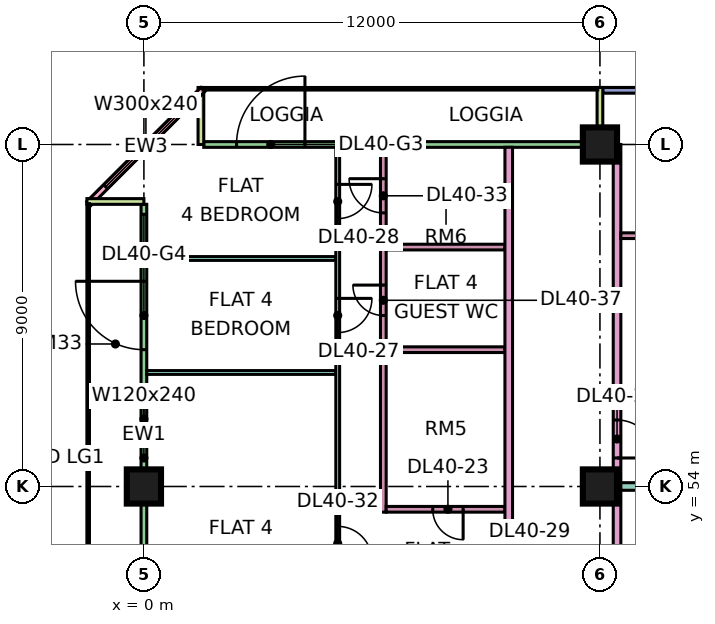
"""IFC4 building model, lengths in metres.
Left out: names, types, materials, properties, quantities, classifications, styles, units other than length and angle.
Written with IfcOpenShell. Run it as: python <this file> out.ifc"""

import sys

from ifc_helpers import new_model, si_unit, direction, frame, frame_2d, origin, origin_2d, place, context, subcontext, project, spatial, rectangle, extrude, element, fill, save


model = new_model("IFC4")
c1 = context("Model", 3, precision=1e-05, world=origin(), true_north=direction((0.0, 1.0)))
c2 = subcontext(c1, "Body", "Model", "MODEL_VIEW")
j1 = project(units=[si_unit("LENGTHUNIT", "METRE"), si_unit("PLANEANGLEUNIT", "RADIAN")], contexts=[c1])
p1 = place(None, origin())
s1 = spatial("IfcSite", under=j1, at=p1, CompositionType="ELEMENT")
p2 = place(p1, origin())
s2 = spatial("IfcBuilding", under=s1, at=p2, CompositionType="ELEMENT")
p3 = place(p2, frame((0.0, 0.0, 176.15)))
s3 = spatial("IfcBuildingStorey", under=s2, at=p3, CompositionType="ELEMENT", Elevation=176.15)
for number, where, z_axis, x_axis in (
    (1, (0.0, 54.0, 0.0), (0.0, 0.0, 1.0), (1.0, 0.0, 0.0)),
    (2, (12.0, 54.0, 0.0), (0.0, 0.0, 1.0), (1.0, 0.0, 0.0)),
    (3, (12.0, 63.0, 0.0), (0.0, 0.0, 1.0), (1.0, 0.0, 0.0)),
):
    element("IfcColumn", number, at=place(p3, frame(where, z_axis=z_axis, x_axis=x_axis)), inside=s3, PredefinedType="COLUMN", context=c2, shape_type="SweptSolid", body=[
        extrude(rectangle(XDim=0.9, YDim=0.9, at=origin_2d()), origin(), (0.0, 0.0, 1.0), 3.75),
    ])
p4 = place(p3, frame((22.5, 64.425, 0.0), z_axis=(0.0, 0.0, 1.0), x_axis=(-1.0, 0.0, 0.0)))
e4 = element("IfcWall", 4, at=p4, inside=s3, PredefinedType="SOLIDWALL", context=c2, shape_type="SweptSolid", body=[
    extrude(rectangle(XDim=10.425, YDim=0.15, at=frame_2d((5.212, 0.0))), origin(), (0.0, 0.0, 1.0), 3.35),
])
p5 = place(p4, frame((0.525, 0.0, 0.45)))
e5 = element("IfcOpeningElement", 5, at=p5, cuts=e4, PredefinedType="OPENING", context=c2, shape_type="SweptSolid", body=[
    extrude(rectangle(XDim=2.4, YDim=2.4, at=frame_2d((1.2, 1.2))), frame((0.0, 0.085, 0.0), z_axis=(0.0, -1.0, 0.0), x_axis=(1.0, 0.0, 0.0)), (0.0, 0.0, 1.0), 0.17),
])
p6 = place(p4, frame((5.85, 0.0, 0.45)))
e6 = element("IfcOpeningElement", 6, at=p6, cuts=e4, PredefinedType="OPENING", context=c2, shape_type="SweptSolid", body=[
    extrude(rectangle(XDim=3.0, YDim=2.4, at=frame_2d((1.5, 1.2))), frame((0.0, 0.085, 0.0), z_axis=(0.0, -1.0, 0.0), x_axis=(1.0, 0.0, 0.0)), (0.0, 0.0, 1.0), 0.17),
])
p7 = place(p3, frame((11.925, 63.0, 0.0), z_axis=(0.0, 0.0, 1.0), x_axis=(-1.0, 0.0, 0.0)))
e7 = element("IfcWall", 7, at=p7, inside=s3, PredefinedType="SOLIDWALL", context=c2, shape_type="SweptSolid", body=[
    extrude(rectangle(XDim=10.35, YDim=0.15, at=frame_2d((5.175, 0.0))), origin(), (0.0, 0.0, 1.0), 3.35),
])
p8 = place(p7, frame((7.688, 0.0, 0.0)))
e8 = element("IfcOpeningElement", 8, at=p8, cuts=e7, PredefinedType="OPENING", context=c2, shape_type="SweptSolid", body=[
    extrude(rectangle(XDim=1.8, YDim=2.4, at=frame_2d((0.9, 1.2))), frame((0.0, 0.085, 0.0), z_axis=(0.0, -1.0, 0.0), x_axis=(1.0, 0.0, 0.0)), (0.0, 0.0, 1.0), 0.17),
])
for number, where, z_axis, x_axis in (
    (9, (12.0, 64.5, 0.0), (0.0, 0.0, 1.0), (0.0, -1.0, 0.0)),
    (10, (1.5, 64.5, 0.0), (0.0, 0.0, 1.0), (0.0, -1.0, 0.0)),
):
    element("IfcWall", number, at=place(p3, frame(where, z_axis=z_axis, x_axis=x_axis)), inside=s3, PredefinedType="SOLIDWALL", context=c2, shape_type="SweptSolid", body=[
        extrude(rectangle(XDim=1.5, YDim=0.15, at=frame_2d((0.75, 0.0))), origin(), (0.0, 0.0, 1.0), 3.35),
    ])
p9 = place(p3, frame((1.553, 64.447, 0.0), z_axis=(0.0, 0.0, 1.0), x_axis=(-0.707106781187, -0.707106781187, 0.0)))
e11 = element("IfcWall", 11, at=p9, inside=s3, PredefinedType="SOLIDWALL", context=c2, shape_type="SweptSolid", body=[
    extrude(rectangle(XDim=4.243, YDim=0.15, at=frame_2d((2.121, 0.0))), origin(), (0.0, 0.0, 1.0), 3.35),
])
p10 = place(p9, frame((0.621, 0.0, 0.45)))
e12 = element("IfcOpeningElement", 12, at=p10, cuts=e11, PredefinedType="OPENING", context=c2, shape_type="SweptSolid", body=[
    extrude(rectangle(XDim=3.0, YDim=2.4, at=frame_2d((1.5, 1.2))), frame((0.0, 0.085, 0.0), z_axis=(0.0, -1.0, 0.0), x_axis=(1.0, 0.0, 0.0)), (0.0, 0.0, 1.0), 0.17),
])
p11 = place(p3, frame((0.0, 61.425, 0.0), z_axis=(0.0, 0.0, 1.0), x_axis=(0.0, -1.0, 0.0)))
e13 = element("IfcWall", 13, at=p11, inside=s3, PredefinedType="SOLIDWALL", context=c2, shape_type="SweptSolid", body=[
    extrude(rectangle(XDim=13.35, YDim=0.15, at=frame_2d((6.675, 0.0))), origin(), (0.0, 0.0, 1.0), 3.35),
])
p12 = place(p11, frame((0.262, 0.0, 0.45)))
e14 = element("IfcOpeningElement", 14, at=p12, cuts=e13, PredefinedType="OPENING", context=c2, shape_type="SweptSolid", body=[
    extrude(rectangle(XDim=0.9, YDim=2.4, at=frame_2d((0.45, 1.2))), frame((0.0, 0.085, 0.0), z_axis=(0.0, -1.0, 0.0), x_axis=(1.0, 0.0, 0.0)), (0.0, 0.0, 1.0), 0.17),
])
p13 = place(p11, frame((2.025, 0.0, 0.0)))
e15 = element("IfcOpeningElement", 15, at=p13, cuts=e13, PredefinedType="OPENING", context=c2, shape_type="SweptSolid", body=[
    extrude(rectangle(XDim=1.8, YDim=2.4, at=frame_2d((0.9, 1.2))), frame((0.0, 0.085, 0.0), z_axis=(0.0, -1.0, 0.0), x_axis=(1.0, 0.0, 0.0)), (0.0, 0.0, 1.0), 0.17),
])
p14 = place(p11, frame((5.05, 0.0, 0.45)))
e16 = element("IfcOpeningElement", 16, at=p14, cuts=e13, PredefinedType="OPENING", context=c2, shape_type="SweptSolid", body=[
    extrude(rectangle(XDim=1.2, YDim=2.4, at=frame_2d((0.6, 1.2))), frame((0.0, 0.085, 0.0), z_axis=(0.0, -1.0, 0.0), x_axis=(1.0, 0.0, 0.0)), (0.0, 0.0, 1.0), 0.17),
])
p15 = place(p11, frame((9.163, 0.0, 0.45)))
e17 = element("IfcOpeningElement", 17, at=p15, cuts=e13, PredefinedType="OPENING", context=c2, shape_type="SweptSolid", body=[
    extrude(rectangle(XDim=3.0, YDim=2.4, at=frame_2d((1.5, 1.2))), frame((0.0, 0.085, 0.0), z_axis=(0.0, -1.0, 0.0), x_axis=(1.0, 0.0, 0.0)), (0.0, 0.0, 1.0), 0.17),
])
p16 = place(p3, frame((-1.5, 61.5, 0.0), z_axis=(0.0, 0.0, 1.0), x_axis=(1.0, 0.0, 0.0)))
e18 = element("IfcWall", 18, at=p16, inside=s3, PredefinedType="SOLIDWALL", context=c2, shape_type="SweptSolid", body=[
    extrude(rectangle(XDim=1.5, YDim=0.15, at=frame_2d((0.75, 0.0))), origin(), (0.0, 0.0, 1.0), 3.35),
])
for number, where, z_axis, x_axis in (
    (19, (0.074, 57.0, 0.0), (0.0, 0.0, 1.0), (1.0, 0.0, 0.0)),
    (20, (0.074, 60.0, 0.0), (0.0, 0.0, 1.0), (1.0, 0.0, 0.0)),
):
    element("IfcWall", number, at=place(p3, frame(where, z_axis=z_axis, x_axis=x_axis)), inside=s3, PredefinedType="PARTITIONING", context=c2, shape_type="SweptSolid", body=[
        extrude(rectangle(XDim=4.976, YDim=0.1, at=frame_2d((2.488, 0.0))), origin(), (0.0, 0.0, 1.0), 3.35),
    ])
p17 = place(p3, frame((5.1, 36.1, 0.0), z_axis=(0.0, 0.0, 1.0), x_axis=(0.0, 1.0, 0.0)))
e21 = element("IfcWall", 21, at=p17, inside=s3, PredefinedType="PARTITIONING", context=c2, shape_type="SweptSolid", body=[
    extrude(rectangle(XDim=26.826, YDim=0.1, at=frame_2d((13.413, 0.0))), origin(), (0.0, 0.0, 1.0), 3.35),
])
p18 = place(p17, frame((0.95, 0.0, 0.0)))
e22 = element("IfcOpeningElement", 22, at=p18, cuts=e21, PredefinedType="OPENING", context=c2, shape_type="SweptSolid", body=[
    extrude(rectangle(XDim=0.9, YDim=2.1, at=frame_2d((0.45, 1.05))), frame((0.0, 0.06, 0.0), z_axis=(0.0, -1.0, 0.0), x_axis=(1.0, 0.0, 0.0)), (0.0, 0.0, 1.0), 0.12),
])
p19 = place(p17, frame((3.95, 0.0, 0.0)))
e23 = element("IfcOpeningElement", 23, at=p19, cuts=e21, PredefinedType="OPENING", context=c2, shape_type="SweptSolid", body=[
    extrude(rectangle(XDim=0.9, YDim=2.1, at=frame_2d((0.45, 1.05))), frame((0.0, 0.06, 0.0), z_axis=(0.0, -1.0, 0.0), x_axis=(1.0, 0.0, 0.0)), (0.0, 0.0, 1.0), 0.12),
])
p20 = place(p17, frame((9.95, 0.0, 0.0)))
e24 = element("IfcOpeningElement", 24, at=p20, cuts=e21, PredefinedType="OPENING", context=c2, shape_type="SweptSolid", body=[
    extrude(rectangle(XDim=0.9, YDim=2.1, at=frame_2d((0.45, 1.05))), frame((0.0, 0.06, 0.0), z_axis=(0.0, -1.0, 0.0), x_axis=(1.0, 0.0, 0.0)), (0.0, 0.0, 1.0), 0.12),
])
p21 = place(p17, frame((21.95, 0.0, 0.0)))
e25 = element("IfcOpeningElement", 25, at=p21, cuts=e21, PredefinedType="OPENING", context=c2, shape_type="SweptSolid", body=[
    extrude(rectangle(XDim=0.9, YDim=2.1, at=frame_2d((0.45, 1.05))), frame((0.0, 0.06, 0.0), z_axis=(0.0, -1.0, 0.0), x_axis=(1.0, 0.0, 0.0)), (0.0, 0.0, 1.0), 0.12),
])
p22 = place(p17, frame((24.95, 0.0, 0.0)))
e26 = element("IfcOpeningElement", 26, at=p22, cuts=e21, PredefinedType="OPENING", context=c2, shape_type="SweptSolid", body=[
    extrude(rectangle(XDim=0.9, YDim=2.1, at=frame_2d((0.45, 1.05))), frame((0.0, 0.06, 0.0), z_axis=(0.0, -1.0, 0.0), x_axis=(1.0, 0.0, 0.0)), (0.0, 0.0, 1.0), 0.12),
])
p23 = place(p17, frame((15.95, 0.0, 0.0)))
e27 = element("IfcOpeningElement", 27, at=p23, cuts=e21, PredefinedType="OPENING", context=c2, shape_type="SweptSolid", body=[
    extrude(rectangle(XDim=0.9, YDim=2.1, at=frame_2d((0.45, 1.05))), frame((0.0, 0.06, 0.0), z_axis=(0.0, -1.0, 0.0), x_axis=(1.0, 0.0, 0.0)), (0.0, 0.0, 1.0), 0.12),
])
p24 = place(p17, frame((6.95, 0.0, 0.0)))
e28 = element("IfcOpeningElement", 28, at=p24, cuts=e21, PredefinedType="OPENING", context=c2, shape_type="SweptSolid", body=[
    extrude(rectangle(XDim=0.9, YDim=2.1, at=frame_2d((0.45, 1.05))), frame((0.0, 0.06, 0.0), z_axis=(0.0, -1.0, 0.0), x_axis=(1.0, 0.0, 0.0)), (0.0, 0.0, 1.0), 0.12),
])
p25 = place(p3, frame((6.3, 53.325, 0.0), z_axis=(0.0, 0.0, 1.0), x_axis=(0.0, 1.0, 0.0)))
e29 = element("IfcWall", 29, at=p25, inside=s3, PredefinedType="PARTITIONING", context=c2, shape_type="SweptSolid", body=[
    extrude(rectangle(XDim=9.601, YDim=0.15, at=frame_2d((4.801, 0.0))), origin(), (0.0, 0.0, 1.0), 3.35),
])
p26 = place(p25, frame((7.875, 0.0, 0.0)))
e30 = element("IfcOpeningElement", 30, at=p26, cuts=e29, PredefinedType="OPENING", context=c2, shape_type="SweptSolid", body=[
    extrude(rectangle(XDim=0.9, YDim=2.1, at=frame_2d((0.45, 1.05))), frame((0.0, 0.085, 0.0), z_axis=(0.0, -1.0, 0.0), x_axis=(1.0, 0.0, 0.0)), (0.0, 0.0, 1.0), 0.17),
])
p27 = place(p25, frame((5.175, 0.0, 0.0)))
e31 = element("IfcOpeningElement", 31, at=p27, cuts=e29, PredefinedType="OPENING", context=c2, shape_type="SweptSolid", body=[
    extrude(rectangle(XDim=0.8, YDim=2.1, at=frame_2d((0.4, 1.05))), frame((0.0, 0.085, 0.0), z_axis=(0.0, -1.0, 0.0), x_axis=(1.0, 0.0, 0.0)), (0.0, 0.0, 1.0), 0.17),
])
p28 = place(p3, frame((6.375, 53.4, 0.0), z_axis=(0.0, 0.0, 1.0), x_axis=(1.0, 0.0, 0.0)))
e32 = element("IfcWall", 32, at=p28, inside=s3, PredefinedType="PARTITIONING", context=c2, shape_type="SweptSolid", body=[
    extrude(rectangle(XDim=3.125, YDim=0.15, at=frame_2d((1.562, 0.0))), origin(), (0.0, 0.0, 1.0), 3.35),
])
p29 = place(p28, frame((1.225, 0.0, 0.0)))
e33 = element("IfcOpeningElement", 33, at=p29, cuts=e32, PredefinedType="OPENING", context=c2, shape_type="SweptSolid", body=[
    extrude(rectangle(XDim=0.8, YDim=2.1, at=frame_2d((0.4, 1.05))), frame((0.0, 0.085, 0.0), z_axis=(0.0, -1.0, 0.0), x_axis=(1.0, 0.0, 0.0)), (0.0, 0.0, 1.0), 0.17),
])
for number, where, z_axis, x_axis in (
    (34, (6.375, 57.6, 0.0), (0.0, 0.0, 1.0), (1.0, 0.0, 0.0)),
    (35, (6.375, 60.3, 0.0), (0.0, 0.0, 1.0), (1.0, 0.0, 0.0)),
):
    element("IfcWall", number, at=place(p3, frame(where, z_axis=z_axis, x_axis=x_axis)), inside=s3, PredefinedType="PARTITIONING", context=c2, shape_type="SweptSolid", body=[
        extrude(rectangle(XDim=3.125, YDim=0.15, at=frame_2d((1.562, 0.0))), origin(), (0.0, 0.0, 1.0), 3.35),
    ])
p30 = place(p3, frame((9.6, 20.0, 0.0), z_axis=(0.0, 0.0, 1.0), x_axis=(0.0, 1.0, 0.0)))
e36 = element("IfcWall", 36, at=p30, inside=s3, PredefinedType="PARTITIONING", context=c2, shape_type="SweptSolid", body=[
    extrude(rectangle(XDim=42.926, YDim=0.2, at=frame_2d((21.463, 0.0))), origin(), (0.0, 0.0, 1.0), 3.35),
])
p31 = place(p30, frame((31.35, 0.0, 0.0)))
e37 = element("IfcOpeningElement", 37, at=p31, cuts=e36, PredefinedType="OPENING", context=c2, shape_type="SweptSolid", body=[
    extrude(rectangle(XDim=1.0, YDim=2.1, at=frame_2d((0.5, 1.05))), frame((0.0, 0.11, 0.0), z_axis=(0.0, -1.0, 0.0), x_axis=(1.0, 0.0, 0.0)), (0.0, 0.0, 1.0), 0.22),
])
p32 = place(p30, frame((0.6, 0.0, 0.0)))
e38 = element("IfcOpeningElement", 38, at=p32, cuts=e36, PredefinedType="OPENING", context=c2, shape_type="SweptSolid", body=[
    extrude(rectangle(XDim=1.2, YDim=2.1, at=frame_2d((0.6, 1.05))), frame((0.0, 0.11, 0.0), z_axis=(0.0, -1.0, 0.0), x_axis=(1.0, 0.0, 0.0)), (0.0, 0.0, 1.0), 0.22),
])
p33 = place(p30, frame((3.9, 0.0, 0.0)))
e39 = element("IfcOpeningElement", 39, at=p33, cuts=e36, PredefinedType="OPENING", context=c2, shape_type="SweptSolid", body=[
    extrude(rectangle(XDim=1.0, YDim=2.1, at=frame_2d((0.5, 1.05))), frame((0.0, 0.11, 0.0), z_axis=(0.0, -1.0, 0.0), x_axis=(1.0, 0.0, 0.0)), (0.0, 0.0, 1.0), 0.22),
])
p34 = place(p3, frame((12.45, 20.0, 0.0), z_axis=(0.0, 0.0, 1.0), x_axis=(0.0, 1.0, 0.0)))
e40 = element("IfcWall", 40, at=p34, inside=s3, PredefinedType="PARTITIONING", context=c2, shape_type="SweptSolid", body=[
    extrude(rectangle(XDim=43.0, YDim=0.2, at=frame_2d((21.5, 0.0))), origin(), (0.0, 0.0, 1.0), 3.35),
])
p35 = place(p34, frame((5.95, 0.0, 0.0)))
e41 = element("IfcOpeningElement", 41, at=p35, cuts=e40, PredefinedType="OPENING", context=c2, shape_type="SweptSolid", body=[
    extrude(rectangle(XDim=1.0, YDim=2.1, at=frame_2d((0.5, 1.05))), frame((0.0, 0.11, 0.0), z_axis=(0.0, -1.0, 0.0), x_axis=(1.0, 0.0, 0.0)), (0.0, 0.0, 1.0), 0.22),
])
p36 = place(p34, frame((12.0, 0.0, 0.0)))
e42 = element("IfcOpeningElement", 42, at=p36, cuts=e40, PredefinedType="OPENING", context=c2, shape_type="SweptSolid", body=[
    extrude(rectangle(XDim=1.0, YDim=2.1, at=frame_2d((0.5, 1.05))), frame((0.0, 0.11, 0.0), z_axis=(0.0, -1.0, 0.0), x_axis=(1.0, 0.0, 0.0)), (0.0, 0.0, 1.0), 0.22),
])
p37 = place(p34, frame((22.75, 0.0, 0.0)))
e43 = element("IfcOpeningElement", 43, at=p37, cuts=e40, PredefinedType="OPENING", context=c2, shape_type="SweptSolid", body=[
    extrude(rectangle(XDim=1.0, YDim=2.1, at=frame_2d((0.5, 1.05))), frame((0.0, 0.11, 0.0), z_axis=(0.0, -1.0, 0.0), x_axis=(1.0, 0.0, 0.0)), (0.0, 0.0, 1.0), 0.22),
])
p38 = place(p34, frame((34.75, 0.0, 0.0)))
e44 = element("IfcOpeningElement", 44, at=p38, cuts=e40, PredefinedType="OPENING", context=c2, shape_type="SweptSolid", body=[
    extrude(rectangle(XDim=1.0, YDim=2.1, at=frame_2d((0.5, 1.05))), frame((0.0, 0.11, 0.0), z_axis=(0.0, -1.0, 0.0), x_axis=(1.0, 0.0, 0.0)), (0.0, 0.0, 1.0), 0.22),
])
p39 = place(p34, frame((1.15, 0.0, 0.0)))
e45 = element("IfcOpeningElement", 45, at=p39, cuts=e40, PredefinedType="OPENING", context=c2, shape_type="SweptSolid", body=[
    extrude(rectangle(XDim=1.8, YDim=2.1, at=frame_2d((0.9, 1.05))), frame((0.0, 0.11, 0.0), z_axis=(0.0, -1.0, 0.0), x_axis=(1.0, 0.0, 0.0)), (0.0, 0.0, 1.0), 0.22),
])
p40 = place(p34, frame((28.6, 0.0, 0.0)))
e46 = element("IfcOpeningElement", 46, at=p40, cuts=e40, PredefinedType="OPENING", context=c2, shape_type="SweptSolid", body=[
    extrude(rectangle(XDim=1.8, YDim=2.1, at=frame_2d((0.9, 1.05))), frame((0.0, 0.11, 0.0), z_axis=(0.0, -1.0, 0.0), x_axis=(1.0, 0.0, 0.0)), (0.0, 0.0, 1.0), 0.22),
])
p41 = place(p3, frame((12.55, 54.0, 0.0), z_axis=(0.0, 0.0, 1.0), x_axis=(1.0, 0.0, 0.0)))
e47 = element("IfcWall", 47, at=p41, inside=s3, PredefinedType="PARTITIONING", context=c2, shape_type="SweptSolid", body=[
    extrude(rectangle(XDim=11.376, YDim=0.2, at=frame_2d((5.688, 0.0))), origin(), (0.0, 0.0, 1.0), 3.35),
])
for number, where, z_axis, x_axis in (
    (48, (12.55, 56.4, 0.0), (0.0, 0.0, 1.0), (1.0, 0.0, 0.0)),
    (49, (12.55, 60.6, 0.0), (0.0, 0.0, 1.0), (1.0, 0.0, 0.0)),
):
    element("IfcWall", number, at=place(p3, frame(where, z_axis=z_axis, x_axis=x_axis)), inside=s3, PredefinedType="PARTITIONING", context=c2, shape_type="SweptSolid", body=[
        extrude(rectangle(XDim=5.225, YDim=0.15, at=frame_2d((2.612, 0.0))), origin(), (0.0, 0.0, 1.0), 3.35),
    ])
p42 = place(p8, frame((1.8, 0.0, 0.0), z_axis=(0.0, 0.0, 1.0), x_axis=(-1.0, 0.0, 0.0)))
e50 = element("IfcDoor", 50, at=p42, inside=s3, OperationType="DOUBLE_DOOR_SINGLE_SWING", PredefinedType="DOOR", context=c2, shape_type="SweptSolid", body=[
    extrude(rectangle(XDim=1.8, YDim=2.4, at=frame_2d((0.9, 1.2))), frame((0.0, 0.025, 0.0), z_axis=(0.0, -1.0, 0.0), x_axis=(1.0, 0.0, 0.0)), (0.0, 0.0, 1.0), 0.05),
])
fill(e8, e50)
p43 = place(p10, origin())
e51 = element("IfcWindow", 51, at=p43, inside=s3, PartitioningType="SINGLE_PANEL", PredefinedType="WINDOW", context=c2, shape_type="SweptSolid", body=[
    extrude(rectangle(XDim=3.0, YDim=2.4, at=frame_2d((1.5, 1.2))), frame((0.0, 0.03, 0.0), z_axis=(0.0, -1.0, 0.0), x_axis=(1.0, 0.0, 0.0)), (0.0, 0.0, 1.0), 0.06),
])
fill(e12, e51)
p44 = place(p12, origin())
e52 = element("IfcWindow", 52, at=p44, inside=s3, PartitioningType="SINGLE_PANEL", PredefinedType="WINDOW", context=c2, shape_type="SweptSolid", body=[
    extrude(rectangle(XDim=0.9, YDim=2.4, at=frame_2d((0.45, 1.2))), frame((0.0, 0.03, 0.0), z_axis=(0.0, -1.0, 0.0), x_axis=(1.0, 0.0, 0.0)), (0.0, 0.0, 1.0), 0.06),
])
fill(e14, e52)
p45 = place(p13, frame((1.8, 0.0, 0.0), z_axis=(0.0, 0.0, 1.0), x_axis=(-1.0, 0.0, 0.0)))
e53 = element("IfcDoor", 53, at=p45, inside=s3, OperationType="DOUBLE_DOOR_SINGLE_SWING", PredefinedType="DOOR", context=c2, shape_type="SweptSolid", body=[
    extrude(rectangle(XDim=1.8, YDim=2.4, at=frame_2d((0.9, 1.2))), frame((0.0, 0.025, 0.0), z_axis=(0.0, -1.0, 0.0), x_axis=(1.0, 0.0, 0.0)), (0.0, 0.0, 1.0), 0.05),
])
fill(e15, e53)
p46 = place(p14, origin())
e54 = element("IfcWindow", 54, at=p46, inside=s3, PartitioningType="SINGLE_PANEL", PredefinedType="WINDOW", context=c2, shape_type="SweptSolid", body=[
    extrude(rectangle(XDim=1.2, YDim=2.4, at=frame_2d((0.6, 1.2))), frame((0.0, 0.03, 0.0), z_axis=(0.0, -1.0, 0.0), x_axis=(1.0, 0.0, 0.0)), (0.0, 0.0, 1.0), 0.06),
])
fill(e16, e54)
p47 = place(p38, frame((1.0, 0.0, 0.0), z_axis=(0.0, 0.0, 1.0), x_axis=(-1.0, 0.0, 0.0)))
e55 = element("IfcDoor", 55, at=p47, inside=s3, OperationType="SINGLE_SWING_LEFT", PredefinedType="DOOR", context=c2, shape_type="SweptSolid", body=[
    extrude(rectangle(XDim=1.0, YDim=2.1, at=frame_2d((0.5, 1.05))), frame((0.0, 0.025, 0.0), z_axis=(0.0, -1.0, 0.0), x_axis=(1.0, 0.0, 0.0)), (0.0, 0.0, 1.0), 0.05),
])
fill(e44, e55)
p48 = place(p29, origin())
e56 = element("IfcDoor", 56, at=p48, inside=s3, OperationType="SINGLE_SWING_RIGHT", PredefinedType="DOOR", context=c2, shape_type="SweptSolid", body=[
    extrude(rectangle(XDim=0.8, YDim=2.1, at=frame_2d((0.4, 1.05))), frame((0.0, 0.025, 0.0), z_axis=(0.0, -1.0, 0.0), x_axis=(1.0, 0.0, 0.0)), (0.0, 0.0, 1.0), 0.05),
])
fill(e33, e56)
p49 = place(p21, origin())
e57 = element("IfcDoor", 57, at=p49, inside=s3, OperationType="SINGLE_SWING_RIGHT", PredefinedType="DOOR", context=c2, shape_type="SweptSolid", body=[
    extrude(rectangle(XDim=0.9, YDim=2.1, at=frame_2d((0.45, 1.05))), frame((0.0, 0.025, 0.0), z_axis=(0.0, -1.0, 0.0), x_axis=(1.0, 0.0, 0.0)), (0.0, 0.0, 1.0), 0.05),
])
fill(e25, e57)
p50 = place(p22, origin())
e58 = element("IfcDoor", 58, at=p50, inside=s3, OperationType="SINGLE_SWING_RIGHT", PredefinedType="DOOR", context=c2, shape_type="SweptSolid", body=[
    extrude(rectangle(XDim=0.9, YDim=2.1, at=frame_2d((0.45, 1.05))), frame((0.0, 0.025, 0.0), z_axis=(0.0, -1.0, 0.0), x_axis=(1.0, 0.0, 0.0)), (0.0, 0.0, 1.0), 0.05),
])
fill(e26, e58)
p51 = place(p23, frame((0.9, 0.0, 0.0), z_axis=(0.0, 0.0, 1.0), x_axis=(-1.0, 0.0, 0.0)))
e59 = element("IfcDoor", 59, at=p51, inside=s3, OperationType="SINGLE_SWING_LEFT", PredefinedType="DOOR", context=c2, shape_type="SweptSolid", body=[
    extrude(rectangle(XDim=0.9, YDim=2.1, at=frame_2d((0.45, 1.05))), frame((0.0, 0.025, 0.0), z_axis=(0.0, -1.0, 0.0), x_axis=(1.0, 0.0, 0.0)), (0.0, 0.0, 1.0), 0.05),
])
fill(e27, e59)
p52 = place(p26, frame((0.9, 0.0, 0.0), z_axis=(0.0, 0.0, 1.0), x_axis=(-1.0, 0.0, 0.0)))
e60 = element("IfcDoor", 60, at=p52, inside=s3, OperationType="SINGLE_SWING_RIGHT", PredefinedType="DOOR", context=c2, shape_type="SweptSolid", body=[
    extrude(rectangle(XDim=0.9, YDim=2.1, at=frame_2d((0.45, 1.05))), frame((0.0, 0.025, 0.0), z_axis=(0.0, -1.0, 0.0), x_axis=(1.0, 0.0, 0.0)), (0.0, 0.0, 1.0), 0.05),
])
fill(e30, e60)
p53 = place(p27, frame((0.8, 0.0, 0.0), z_axis=(0.0, 0.0, 1.0), x_axis=(-1.0, 0.0, 0.0)))
e61 = element("IfcDoor", 61, at=p53, inside=s3, OperationType="SINGLE_SWING_RIGHT", PredefinedType="DOOR", context=c2, shape_type="SweptSolid", body=[
    extrude(rectangle(XDim=0.8, YDim=2.1, at=frame_2d((0.4, 1.05))), frame((0.0, 0.025, 0.0), z_axis=(0.0, -1.0, 0.0), x_axis=(1.0, 0.0, 0.0)), (0.0, 0.0, 1.0), 0.05),
])
fill(e31, e61)
save(model, sys.argv[1])
